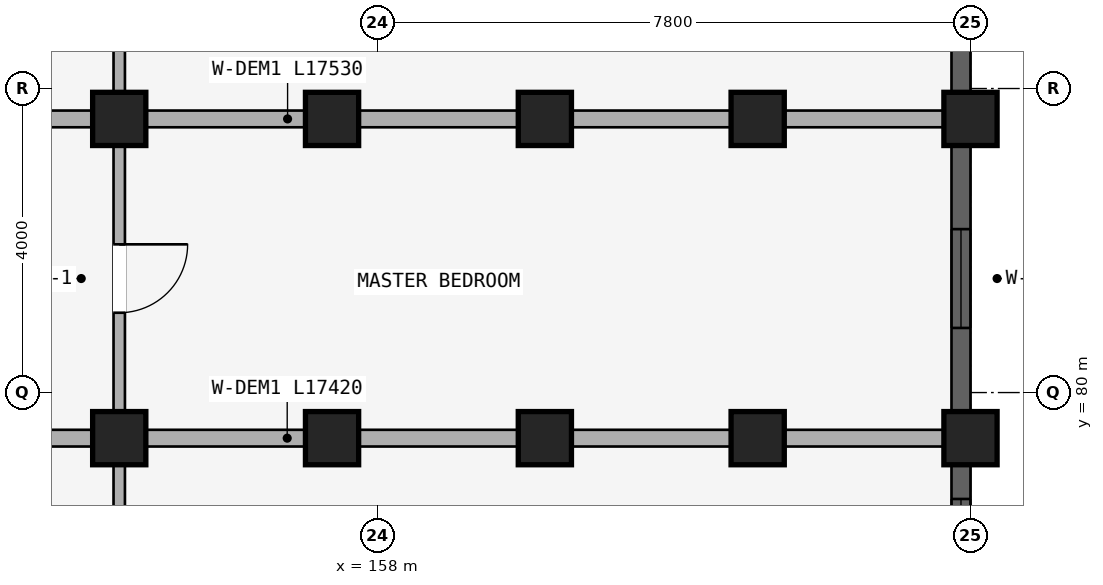
"""IFC4 building model, lengths in metres.
Left out: names, types, materials, properties, quantities, classifications, styles, units other than length and angle.
Written with IfcOpenShell. Run it as: python <this file> out.ifc"""

import sys

from ifc_helpers import new_model, si_unit, direction, frame, frame_2d, origin, origin_2d, place, context, subcontext, project, spatial, rectangle, extrude, element, fill, save


model = new_model("IFC4")
c1 = context("Model", 3, precision=1e-05, world=origin(), true_north=direction((0.0, 1.0)))
c2 = subcontext(c1, "Body", "Model", "MODEL_VIEW")
j1 = project(units=[si_unit("LENGTHUNIT", "METRE"), si_unit("PLANEANGLEUNIT", "RADIAN")], contexts=[c1])
p1 = place(None, origin())
s1 = spatial("IfcSite", under=j1, at=p1, CompositionType="ELEMENT")
p2 = place(p1, origin())
s2 = spatial("IfcBuilding", under=s1, at=p2, CompositionType="ELEMENT")
p3 = place(p2, frame((0.0, 0.0, 18.15)))
s3 = spatial("IfcBuildingStorey", under=s2, at=p3, CompositionType="ELEMENT", Elevation=18.15)
for number, where, z_axis, x_axis in (
    (1, (154.6, 83.6, 0.0), (0.0, 0.0, 1.0), (1.0, 0.0, 0.0)),
    (2, (157.4, 83.6, 0.0), (0.0, 0.0, 1.0), (1.0, 0.0, 0.0)),
    (3, (160.2, 83.6, 0.0), (0.0, 0.0, 1.0), (1.0, 0.0, 0.0)),
    (4, (163.0, 83.6, 0.0), (0.0, 0.0, 1.0), (1.0, 0.0, 0.0)),
    (5, (165.8, 83.6, 0.0), (0.0, 0.0, 1.0), (1.0, 0.0, 0.0)),
    (6, (154.6, 79.4, 0.0), (0.0, 0.0, 1.0), (1.0, 0.0, 0.0)),
    (7, (157.4, 79.4, 0.0), (0.0, 0.0, 1.0), (1.0, 0.0, 0.0)),
    (8, (160.2, 79.4, 0.0), (0.0, 0.0, 1.0), (1.0, 0.0, 0.0)),
    (9, (163.0, 79.4, 0.0), (0.0, 0.0, 1.0), (1.0, 0.0, 0.0)),
    (10, (165.8, 79.4, 0.0), (0.0, 0.0, 1.0), (1.0, 0.0, 0.0)),
):
    element("IfcColumn", number, at=place(p3, frame(where, z_axis=z_axis, x_axis=x_axis)), inside=s3, PredefinedType="COLUMN", context=c2, shape_type="SweptSolid", body=[
        extrude(rectangle(XDim=0.7, YDim=0.7, at=origin_2d()), origin(), (0.0, 0.0, 1.0), 2.93),
    ])
p4 = place(p3, frame((154.6, 87.57, 0.0), z_axis=(0.0, 0.0, 1.0), x_axis=(0.0, -1.0, 0.0)))
e11 = element("IfcWall", 11, at=p4, inside=s3, PredefinedType="PARTITIONING", context=c2, shape_type="SweptSolid", body=[
    extrude(rectangle(XDim=3.89, YDim=0.15, at=frame_2d((1.945, 0.0))), origin(), (0.0, 0.0, 1.0), 2.372),
])
p5 = place(p4, frame((1.495, 0.0, 0.0)))
e12 = element("IfcOpeningElement", 12, at=p5, cuts=e11, PredefinedType="OPENING", context=c2, shape_type="SweptSolid", body=[
    extrude(rectangle(XDim=0.9, YDim=2.1, at=frame_2d((0.45, 1.05))), frame((0.0, 0.085, 0.0), z_axis=(0.0, -1.0, 0.0), x_axis=(1.0, 0.0, 0.0)), (0.0, 0.0, 1.0), 0.17),
])
p6 = place(p3, frame((154.6, 83.52, 0.0), z_axis=(0.0, 0.0, 1.0), x_axis=(0.0, -1.0, 0.0)))
e13 = element("IfcWall", 13, at=p6, inside=s3, PredefinedType="PARTITIONING", context=c2, shape_type="SweptSolid", body=[
    extrude(rectangle(XDim=4.04, YDim=0.15, at=frame_2d((2.02, 0.0))), origin(), (0.0, 0.0, 1.0), 2.372),
])
p7 = place(p6, frame((1.57, 0.0, 0.0)))
e14 = element("IfcOpeningElement", 14, at=p7, cuts=e13, PredefinedType="OPENING", context=c2, shape_type="SweptSolid", body=[
    extrude(rectangle(XDim=0.9, YDim=2.1, at=frame_2d((0.45, 1.05))), frame((0.0, 0.085, 0.0), z_axis=(0.0, -1.0, 0.0), x_axis=(1.0, 0.0, 0.0)), (0.0, 0.0, 1.0), 0.17),
])
p8 = place(p3, frame((148.05, 83.6, 0.0), z_axis=(0.0, 0.0, 1.0), x_axis=(1.0, 0.0, 0.0)))
e15 = element("IfcWall", 15, at=p8, inside=s3, PredefinedType="STANDARD", context=c2, shape_type="SweptSolid", body=[
    extrude(rectangle(XDim=17.53, YDim=0.22, at=frame_2d((8.765, 0.0))), origin(), (0.0, 0.0, 1.0), 2.372),
])
p9 = place(p3, frame((154.6, 79.32, 0.0), z_axis=(0.0, 0.0, 1.0), x_axis=(0.0, -1.0, 0.0)))
e16 = element("IfcWall", 16, at=p9, inside=s3, PredefinedType="PLUMBINGWALL", context=c2, shape_type="SweptSolid", body=[
    extrude(rectangle(XDim=2.64, YDim=0.15, at=frame_2d((1.32, 0.0))), origin(), (0.0, 0.0, 1.0), 2.372),
])
p10 = place(p9, frame((0.87, 0.0, 0.0)))
e17 = element("IfcOpeningElement", 17, at=p10, cuts=e16, PredefinedType="OPENING", context=c2, shape_type="SweptSolid", body=[
    extrude(rectangle(XDim=0.9, YDim=2.1, at=frame_2d((0.45, 1.05))), frame((0.0, 0.085, 0.0), z_axis=(0.0, -1.0, 0.0), x_axis=(1.0, 0.0, 0.0)), (0.0, 0.0, 1.0), 0.17),
])
p11 = place(p3, frame((148.1, 79.4, 0.0), z_axis=(0.0, 0.0, 1.0), x_axis=(1.0, 0.0, 0.0)))
e18 = element("IfcWall", 18, at=p11, inside=s3, PredefinedType="STANDARD", context=c2, shape_type="SweptSolid", body=[
    extrude(rectangle(XDim=17.42, YDim=0.22, at=frame_2d((8.71, 0.0))), origin(), (0.0, 0.0, 1.0), 2.372),
])
p12 = place(p3, frame((165.675, 87.447, 0.0), z_axis=(0.0, 0.0, 1.0), x_axis=(0.0, -1.0, 0.0)))
e19 = element("IfcWall", 19, at=p12, inside=s3, PredefinedType="STANDARD", context=c2, shape_type="SweptSolid", body=[
    extrude(rectangle(XDim=3.493, YDim=0.25, at=frame_2d((1.747, 0.0))), origin(), (0.0, 0.0, 1.0), 2.472),
])
p13 = place(p12, frame((1.096, 0.0, 0.88)))
e20 = element("IfcOpeningElement", 20, at=p13, cuts=e19, PredefinedType="OPENING", context=c2, shape_type="SweptSolid", body=[
    extrude(rectangle(XDim=1.3, YDim=1.4, at=frame_2d((0.65, 0.7))), frame((0.0, 0.135, 0.0), z_axis=(0.0, -1.0, 0.0), x_axis=(1.0, 0.0, 0.0)), (0.0, 0.0, 1.0), 0.27),
])
p14 = place(p3, frame((165.675, 83.247, 0.0), z_axis=(0.0, 0.0, 1.0), x_axis=(0.0, -1.0, 0.0)))
e21 = element("IfcWall", 21, at=p14, inside=s3, PredefinedType="STANDARD", context=c2, shape_type="SweptSolid", body=[
    extrude(rectangle(XDim=3.493, YDim=0.25, at=frame_2d((1.747, 0.0))), origin(), (0.0, 0.0, 1.0), 2.472),
])
p15 = place(p14, frame((1.096, 0.0, 0.88)))
e22 = element("IfcOpeningElement", 22, at=p15, cuts=e21, PredefinedType="OPENING", context=c2, shape_type="SweptSolid", body=[
    extrude(rectangle(XDim=1.3, YDim=1.4, at=frame_2d((0.65, 0.7))), frame((0.0, 0.135, 0.0), z_axis=(0.0, -1.0, 0.0), x_axis=(1.0, 0.0, 0.0)), (0.0, 0.0, 1.0), 0.27),
])
p16 = place(p3, frame((165.675, 79.046, 0.0), z_axis=(0.0, 0.0, 1.0), x_axis=(0.0, -1.0, 0.0)))
e23 = element("IfcWall", 23, at=p16, inside=s3, PredefinedType="STANDARD", context=c2, shape_type="SweptSolid", body=[
    extrude(rectangle(XDim=2.093, YDim=0.25, at=frame_2d((1.046, 0.0))), origin(), (0.0, 0.0, 1.0), 2.472),
])
p17 = place(p16, frame((0.447, 0.0, 0.772)))
e24 = element("IfcOpeningElement", 24, at=p17, cuts=e23, PredefinedType="OPENING", context=c2, shape_type="SweptSolid", body=[
    extrude(rectangle(XDim=1.2, YDim=1.5, at=frame_2d((0.6, 0.75))), frame((0.0, 0.135, 0.0), z_axis=(0.0, -1.0, 0.0), x_axis=(1.0, 0.0, 0.0)), (0.0, 0.0, 1.0), 0.27),
])
p18 = place(p15, origin())
e25 = element("IfcWindow", 25, at=p18, inside=s3, PartitioningType="DOUBLE_PANEL_HORIZONTAL", PredefinedType="WINDOW", context=c2, shape_type="SweptSolid", body=[
    extrude(rectangle(XDim=1.3, YDim=1.4, at=frame_2d((0.65, 0.7))), frame((0.0, 0.03, 0.0), z_axis=(0.0, -1.0, 0.0), x_axis=(1.0, 0.0, 0.0)), (0.0, 0.0, 1.0), 0.06),
])
fill(e22, e25)
p19 = place(p17, origin())
e26 = element("IfcWindow", 26, at=p19, inside=s3, PartitioningType="SINGLE_PANEL", PredefinedType="WINDOW", context=c2, shape_type="SweptSolid", body=[
    extrude(rectangle(XDim=1.2, YDim=1.5, at=frame_2d((0.6, 0.75))), frame((0.0, 0.03, 0.0), z_axis=(0.0, -1.0, 0.0), x_axis=(1.0, 0.0, 0.0)), (0.0, 0.0, 1.0), 0.06),
])
fill(e24, e26)
p20 = place(p7, origin())
e27 = element("IfcDoor", 27, at=p20, inside=s3, OperationType="SINGLE_SWING_LEFT", PredefinedType="DOOR", context=c2, shape_type="SweptSolid", body=[
    extrude(rectangle(XDim=0.9, YDim=2.1, at=frame_2d((0.45, 1.05))), frame((0.0, 0.025, 0.0), z_axis=(0.0, -1.0, 0.0), x_axis=(1.0, 0.0, 0.0)), (0.0, 0.0, 1.0), 0.05),
])
fill(e14, e27)
save(model, sys.argv[1])
